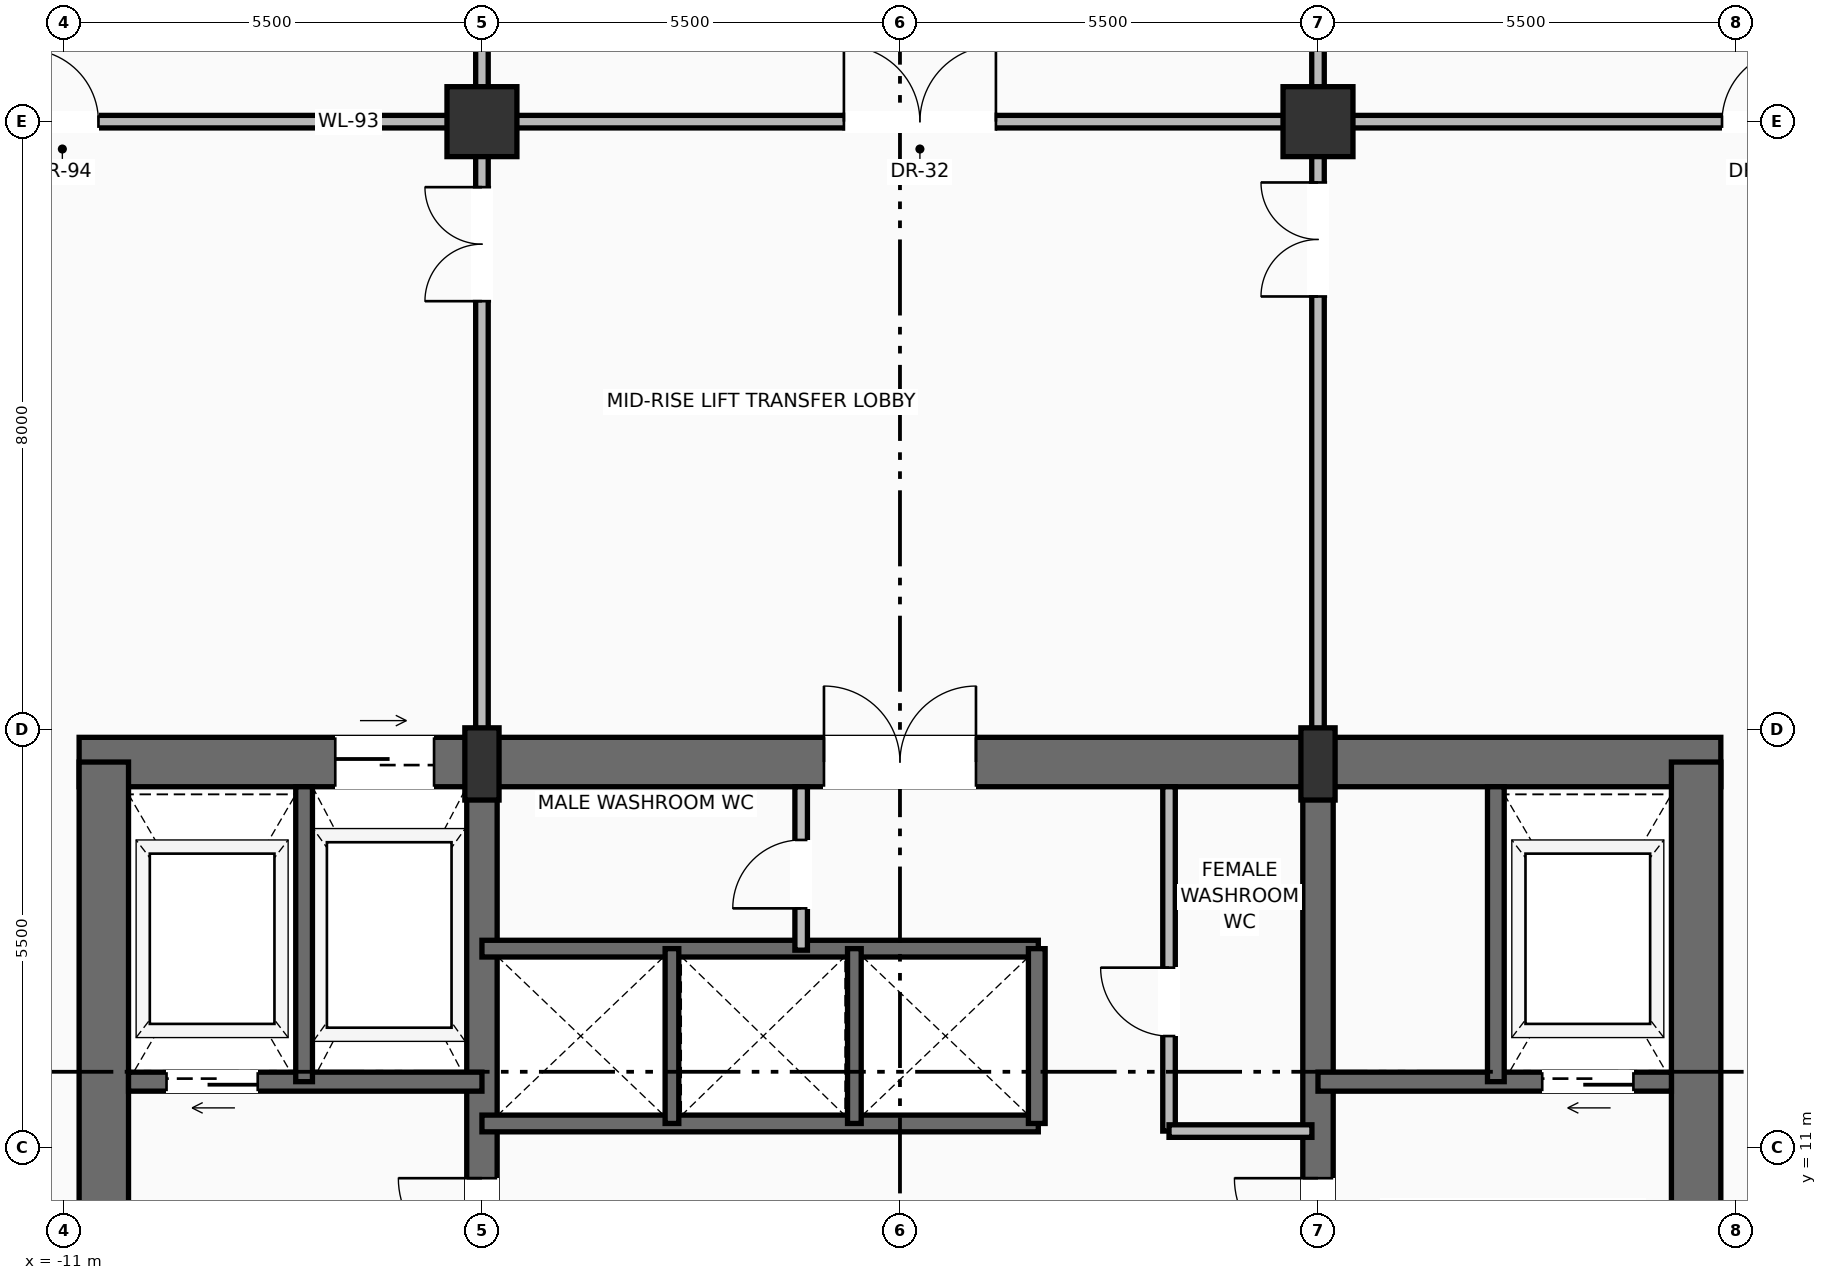
"""IFC4 building model, lengths in metres.
Left out: names, types, materials, properties, quantities, classifications, styles, units other than length and angle.
Written with IfcOpenShell. Run it as: python <this file> out.ifc"""

import sys

from ifc_helpers import new_model, si_unit, direction, frame, frame_2d, origin, origin_2d, place, context, subcontext, project, spatial, rectangle, extrude, source, transform, mapped, element, fill, save


model = new_model("IFC4")
c1 = context("Model", 3, precision=1e-05, world=origin(), true_north=direction((0.0, 1.0)))
c2 = subcontext(c1, "Body", "Model", "MODEL_VIEW")
j1 = project(units=[si_unit("LENGTHUNIT", "METRE"), si_unit("PLANEANGLEUNIT", "RADIAN")], contexts=[c1])
p1 = place(None, origin())
s1 = spatial("IfcSite", under=j1, at=p1, CompositionType="ELEMENT")
p2 = place(p1, origin())
s2 = spatial("IfcBuilding", under=s1, at=p2, CompositionType="ELEMENT")
p3 = place(p2, frame((0.0, 0.0, 121.0)))
s3 = spatial("IfcBuildingStorey", under=s2, at=p3, CompositionType="ELEMENT", Elevation=121.0)
p4 = place(p3, frame((-10.8, 16.075, 0.0), z_axis=(0.0, 0.0, 1.0), x_axis=(1.0, 0.0, 0.0)))
e1 = element("IfcWall", 1, at=p4, inside=s3, PredefinedType="SHEAR", context=c2, shape_type="SweptSolid", body=[
    extrude(rectangle(XDim=21.6, YDim=0.65, at=frame_2d((10.8, 0.0))), origin(), (0.0, 0.0, 1.0), 4.37),
])
p5 = place(p4, frame((3.37, 0.0, 0.0)))
e2 = element("IfcOpeningElement", 2, at=p5, cuts=e1, PredefinedType="OPENING", context=c2, shape_type="SweptSolid", body=[
    extrude(rectangle(XDim=1.3, YDim=2.3, at=frame_2d((0.65, 1.15))), frame((0.0, 0.335, 0.0), z_axis=(0.0, -1.0, 0.0), x_axis=(1.0, 0.0, 0.0)), (0.0, 0.0, 1.0), 0.67),
])
p6 = place(p4, frame((9.8, 0.0, 0.0)))
e3 = element("IfcOpeningElement", 3, at=p6, cuts=e1, PredefinedType="OPENING", context=c2, shape_type="SweptSolid", body=[
    extrude(rectangle(XDim=2.0, YDim=2.4, at=frame_2d((1.0, 1.2))), frame((0.0, 0.335, 0.0), z_axis=(0.0, -1.0, 0.0), x_axis=(1.0, 0.0, 0.0)), (0.0, 0.0, 1.0), 0.67),
])
for number, where, z_axis, x_axis in (
    (4, (-10.475, 0.525, 0.0), (0.0, 0.0, 1.0), (0.0, 1.0, 0.0)),
    (5, (10.475, 0.525, 0.0), (0.0, 0.0, 1.0), (0.0, 1.0, 0.0)),
):
    element("IfcWall", number, at=place(p3, frame(where, z_axis=z_axis, x_axis=x_axis)), inside=s3, PredefinedType="SHEAR", context=c2, shape_type="SweptSolid", body=[
        extrude(rectangle(XDim=15.55, YDim=0.65, at=frame_2d((7.775, 0.0))), origin(), (0.0, 0.0, 1.0), 4.37),
    ])
p7 = place(p3, frame((-5.5, 0.525, 0.0), z_axis=(0.0, 0.0, 1.0), x_axis=(0.0, 1.0, 0.0)))
e6 = element("IfcWall", 6, at=p7, inside=s3, PredefinedType="SHEAR", context=c2, shape_type="SweptSolid", body=[
    extrude(rectangle(XDim=15.55, YDim=0.4, at=frame_2d((7.775, 0.0))), origin(), (0.0, 0.0, 1.0), 4.37),
])
p8 = place(p7, frame((8.975, 0.0, 0.0)))
e7 = element("IfcOpeningElement", 7, at=p8, cuts=e6, PredefinedType="OPENING", context=c2, shape_type="SweptSolid", body=[
    extrude(rectangle(XDim=1.1, YDim=2.2, at=frame_2d((0.55, 1.1))), frame((0.0, 0.21, 0.0), z_axis=(0.0, -1.0, 0.0), x_axis=(1.0, 0.0, 0.0)), (0.0, 0.0, 1.0), 0.42),
])
p9 = place(p3, frame((5.5, 0.525, 0.0), z_axis=(0.0, 0.0, 1.0), x_axis=(0.0, 1.0, 0.0)))
e8 = element("IfcWall", 8, at=p9, inside=s3, PredefinedType="SHEAR", context=c2, shape_type="SweptSolid", body=[
    extrude(rectangle(XDim=15.55, YDim=0.4, at=frame_2d((7.775, 0.0))), origin(), (0.0, 0.0, 1.0), 4.37),
])
p10 = place(p9, frame((8.975, 0.0, 0.0)))
e9 = element("IfcOpeningElement", 9, at=p10, cuts=e8, PredefinedType="OPENING", context=c2, shape_type="SweptSolid", body=[
    extrude(rectangle(XDim=1.1, YDim=2.2, at=frame_2d((0.55, 1.1))), frame((0.0, 0.21, 0.0), z_axis=(0.0, -1.0, 0.0), x_axis=(1.0, 0.0, 0.0)), (0.0, 0.0, 1.0), 0.42),
])
m1 = source(origin(), c2, "Body", "SweptSolid", [
    extrude(rectangle(XDim=0.45, YDim=0.95, at=origin_2d()), origin(), (0.0, 0.0, 1.0), 4.6),
])
for number, where, z_axis, x_axis in (
    (10, (-5.5, 16.05, 0.0), (0.0, 0.0, 1.0), (1.0, 0.0, 0.0)),
    (11, (5.5, 16.05, 0.0), (0.0, 0.0, 1.0), (1.0, 0.0, 0.0)),
):
    element("IfcColumn", number, at=place(p3, frame(where, z_axis=z_axis, x_axis=x_axis)), inside=s3, PredefinedType="PILASTER", context=c2, shape_type="MappedRepresentation", body=[
        mapped(m1, transform((0.0, 0.0, 0.0), scale=1.0)),
    ])
m2 = source(origin(), c2, "Body", "SweptSolid", [
    extrude(rectangle(XDim=0.92, YDim=0.92, at=origin_2d()), origin(), (0.0, 0.0, 1.0), 4.6),
])
for number, where, z_axis, x_axis in (
    (12, (-5.5, 24.5, 0.0), (0.0, 0.0, 1.0), (1.0, 0.0, 0.0)),
    (13, (5.5, 24.5, 0.0), (0.0, 0.0, 1.0), (1.0, 0.0, 0.0)),
):
    element("IfcColumn", number, at=place(p3, frame(where, z_axis=z_axis, x_axis=x_axis)), inside=s3, PredefinedType="COLUMN", context=c2, shape_type="MappedRepresentation", body=[
        mapped(m2, transform((0.0, 0.0, 0.0), scale=1.0)),
    ])
p11 = place(p3, frame((-21.204, 17.641, 0.0), z_axis=(0.0, 0.0, 1.0), x_axis=(0.551762134215, 0.834001527125, 0.0)))
e14 = element("IfcWall", 14, at=p11, inside=s3, PredefinedType="SOLIDWALL", context=c2, shape_type="SweptSolid", body=[
    extrude(rectangle(XDim=18.066, YDim=0.28, at=frame_2d((9.033, 0.0))), origin(), (0.0, 0.0, 1.0), 3.95),
])
p12 = place(p11, frame((4.336, 0.0, 0.0)))
e15 = element("IfcOpeningElement", 15, at=p12, cuts=e14, PredefinedType="OPENING", context=c2, shape_type="SweptSolid", body=[
    extrude(rectangle(XDim=1.6, YDim=2.35, at=frame_2d((0.8, 1.175))), frame((0.0, 0.15, 0.0), z_axis=(0.0, -1.0, 0.0), x_axis=(1.0, 0.0, 0.0)), (0.0, 0.0, 1.0), 0.3),
])
p13 = place(p11, frame((12.285, 0.0, 0.9)))
e16 = element("IfcOpeningElement", 16, at=p13, cuts=e14, PredefinedType="OPENING", context=c2, shape_type="SweptSolid", body=[
    extrude(rectangle(XDim=2.0, YDim=1.55, at=frame_2d((1.0, 0.775))), frame((0.0, 0.15, 0.0), z_axis=(0.0, -1.0, 0.0), x_axis=(1.0, 0.0, 0.0)), (0.0, 0.0, 1.0), 0.3),
])
p14 = place(p3, frame((-5.5, 11.87, 0.0), z_axis=(0.0, 0.0, 1.0), x_axis=(-1.0, 0.0, 0.0)))
e17 = element("IfcWall", 17, at=p14, inside=s3, PredefinedType="SOLIDWALL", context=c2, shape_type="SweptSolid", body=[
    extrude(rectangle(XDim=4.65, YDim=0.25, at=frame_2d((2.325, 0.0))), origin(), (0.0, 0.0, 1.0), 4.37),
])
p15 = place(p14, frame((2.95, 0.0, 0.0)))
e18 = element("IfcOpeningElement", 18, at=p15, cuts=e17, PredefinedType="OPENING", context=c2, shape_type="SweptSolid", body=[
    extrude(rectangle(XDim=1.2, YDim=2.25, at=frame_2d((0.6, 1.125))), frame((0.0, 0.135, 0.0), z_axis=(0.0, -1.0, 0.0), x_axis=(1.0, 0.0, 0.0)), (0.0, 0.0, 1.0), 0.27),
])
p16 = place(p3, frame((-7.84, 11.87, 0.0), z_axis=(0.0, 0.0, 1.0), x_axis=(0.0, 1.0, 0.0)))
e19 = element("IfcWall", 19, at=p16, inside=s3, PredefinedType="SOLIDWALL", context=c2, shape_type="SweptSolid", body=[
    extrude(rectangle(XDim=3.88, YDim=0.22, at=frame_2d((1.94, 0.0))), origin(), (0.0, 0.0, 1.0), 4.37),
])
p17 = place(p3, frame((10.15, 11.87, 0.0), z_axis=(0.0, 0.0, 1.0), x_axis=(-1.0, 0.0, 0.0)))
e20 = element("IfcWall", 20, at=p17, inside=s3, PredefinedType="SOLIDWALL", context=c2, shape_type="SweptSolid", body=[
    extrude(rectangle(XDim=4.65, YDim=0.25, at=frame_2d((2.325, 0.0))), origin(), (0.0, 0.0, 1.0), 4.37),
])
p18 = place(p17, frame((0.5, 0.0, 0.0)))
e21 = element("IfcOpeningElement", 21, at=p18, cuts=e20, PredefinedType="OPENING", context=c2, shape_type="SweptSolid", body=[
    extrude(rectangle(XDim=1.2, YDim=2.25, at=frame_2d((0.6, 1.125))), frame((0.0, 0.135, 0.0), z_axis=(0.0, -1.0, 0.0), x_axis=(1.0, 0.0, 0.0)), (0.0, 0.0, 1.0), 0.27),
])
p19 = place(p3, frame((7.84, 11.87, 0.0), z_axis=(0.0, 0.0, 1.0), x_axis=(0.0, 1.0, 0.0)))
e22 = element("IfcWall", 22, at=p19, inside=s3, PredefinedType="SOLIDWALL", context=c2, shape_type="SweptSolid", body=[
    extrude(rectangle(XDim=3.88, YDim=0.22, at=frame_2d((1.94, 0.0))), origin(), (0.0, 0.0, 1.0), 4.37),
])
for number, where, z_axis, x_axis in (
    (23, (-5.5, 11.32, 0.0), (0.0, 0.0, 1.0), (1.0, 0.0, 0.0)),
    (24, (-5.5, 13.62, 0.0), (0.0, 0.0, 1.0), (1.0, 0.0, 0.0)),
):
    element("IfcWall", number, at=place(p3, frame(where, z_axis=z_axis, x_axis=x_axis)), inside=s3, PredefinedType="SOLIDWALL", context=c2, shape_type="SweptSolid", body=[
        extrude(rectangle(XDim=7.32, YDim=0.22, at=frame_2d((3.66, 0.0))), origin(), (0.0, 0.0, 1.0), 4.37),
    ])
p20 = place(p3, frame((1.8, 11.32, 0.0), z_axis=(0.0, 0.0, 1.0), x_axis=(0.0, 1.0, 0.0)))
e25 = element("IfcWall", 25, at=p20, inside=s3, PredefinedType="SOLIDWALL", context=c2, shape_type="SweptSolid", body=[
    extrude(rectangle(XDim=2.3, YDim=0.22, at=frame_2d((1.15, 0.0))), origin(), (0.0, 0.0, 1.0), 4.37),
])
for number, where, z_axis, x_axis in (
    (26, (-3.0, 11.32, 0.0), (0.0, 0.0, 1.0), (0.0, 1.0, 0.0)),
    (27, (-0.6, 11.32, 0.0), (0.0, 0.0, 1.0), (0.0, 1.0, 0.0)),
):
    element("IfcWall", number, at=place(p3, frame(where, z_axis=z_axis, x_axis=x_axis)), inside=s3, PredefinedType="SOLIDWALL", context=c2, shape_type="SweptSolid", body=[
        extrude(rectangle(XDim=2.3, YDim=0.18, at=frame_2d((1.15, 0.0))), origin(), (0.0, 0.0, 1.0), 4.37),
    ])
p21 = place(p3, frame((-1.3, 13.6, 0.0), z_axis=(0.0, 0.0, 1.0), x_axis=(0.0, 1.0, 0.0)))
e28 = element("IfcWall", 28, at=p21, inside=s3, PredefinedType="PARTITIONING", context=c2, shape_type="SweptSolid", body=[
    extrude(rectangle(XDim=2.15, YDim=0.165, at=frame_2d((1.075, 0.0))), origin(), (0.0, 0.0, 1.0), 4.362),
])
p22 = place(p21, frame((0.55, 0.0, 0.0)))
e29 = element("IfcOpeningElement", 29, at=p22, cuts=e28, PredefinedType="OPENING", context=c2, shape_type="SweptSolid", body=[
    extrude(rectangle(XDim=0.9, YDim=2.1, at=frame_2d((0.45, 1.05))), frame((0.0, 0.093, 0.0), z_axis=(0.0, -1.0, 0.0), x_axis=(1.0, 0.0, 0.0)), (0.0, 0.0, 1.0), 0.185),
])
p23 = place(p3, frame((3.54, 11.22, 0.0), z_axis=(0.0, 0.0, 1.0), x_axis=(0.0, 1.0, 0.0)))
e30 = element("IfcWall", 30, at=p23, inside=s3, PredefinedType="PARTITIONING", context=c2, shape_type="SweptSolid", body=[
    extrude(rectangle(XDim=4.53, YDim=0.165, at=frame_2d((2.265, 0.0))), origin(), (0.0, 0.0, 1.0), 4.362),
])
p24 = place(p23, frame((1.25, 0.0, 0.0)))
e31 = element("IfcOpeningElement", 31, at=p24, cuts=e30, PredefinedType="OPENING", context=c2, shape_type="SweptSolid", body=[
    extrude(rectangle(XDim=0.9, YDim=2.1, at=frame_2d((0.45, 1.05))), frame((0.0, 0.093, 0.0), z_axis=(0.0, -1.0, 0.0), x_axis=(1.0, 0.0, 0.0)), (0.0, 0.0, 1.0), 0.185),
])
p25 = place(p3, frame((3.54, 11.22, 0.0), z_axis=(0.0, 0.0, 1.0), x_axis=(1.0, 0.0, 0.0)))
e32 = element("IfcWall", 32, at=p25, inside=s3, PredefinedType="PARTITIONING", context=c2, shape_type="SweptSolid", body=[
    extrude(rectangle(XDim=1.88, YDim=0.165, at=frame_2d((0.94, 0.0))), origin(), (0.0, 0.0, 1.0), 4.362),
])
p26 = place(p3, frame((-16.822, 24.5, 0.0), z_axis=(0.0, 0.0, 1.0), x_axis=(1.0, 0.0, 0.0)))
e33 = element("IfcWall", 33, at=p26, inside=s3, PredefinedType="PARTITIONING", context=c2, shape_type="SweptSolid", body=[
    extrude(rectangle(XDim=34.168, YDim=0.165, at=frame_2d((17.084, 0.0))), origin(), (0.0, 0.0, 1.0), 3.746),
])
p27 = place(p26, frame((16.084, 0.0, 0.0)))
e34 = element("IfcOpeningElement", 34, at=p27, cuts=e33, PredefinedType="OPENING", context=c2, shape_type="SweptSolid", body=[
    extrude(rectangle(XDim=2.0, YDim=2.4, at=frame_2d((1.0, 1.2))), frame((0.0, 0.093, 0.0), z_axis=(0.0, -1.0, 0.0), x_axis=(1.0, 0.0, 0.0)), (0.0, 0.0, 1.0), 0.185),
])
p28 = place(p26, frame((5.326, 0.0, 0.0)))
e35 = element("IfcOpeningElement", 35, at=p28, cuts=e33, PredefinedType="OPENING", context=c2, shape_type="SweptSolid", body=[
    extrude(rectangle(XDim=0.95, YDim=2.2, at=frame_2d((0.475, 1.1))), frame((0.0, 0.093, 0.0), z_axis=(0.0, -1.0, 0.0), x_axis=(1.0, 0.0, 0.0)), (0.0, 0.0, 1.0), 0.185),
])
p29 = place(p26, frame((27.637, 0.0, 0.0)))
e36 = element("IfcOpeningElement", 36, at=p29, cuts=e33, PredefinedType="OPENING", context=c2, shape_type="SweptSolid", body=[
    extrude(rectangle(XDim=0.95, YDim=2.2, at=frame_2d((0.475, 1.1))), frame((0.0, 0.093, 0.0), z_axis=(0.0, -1.0, 0.0), x_axis=(1.0, 0.0, 0.0)), (0.0, 0.0, 1.0), 0.185),
])
p30 = place(p3, frame((-5.5, 16.42, 0.0), z_axis=(0.0, 0.0, 1.0), x_axis=(0.0, 1.0, 0.0)))
e37 = element("IfcWall", 37, at=p30, inside=s3, PredefinedType="PARTITIONING", context=c2, shape_type="SweptSolid", body=[
    extrude(rectangle(XDim=25.193, YDim=0.165, at=frame_2d((12.597, 0.0))), origin(), (0.0, 0.0, 1.0), 3.746),
])
p31 = place(p30, frame((5.718, 0.0, 0.0)))
e38 = element("IfcOpeningElement", 38, at=p31, cuts=e37, PredefinedType="OPENING", context=c2, shape_type="SweptSolid", body=[
    extrude(rectangle(XDim=1.5, YDim=2.25, at=frame_2d((0.75, 1.125))), frame((0.0, 0.093, 0.0), z_axis=(0.0, -1.0, 0.0), x_axis=(1.0, 0.0, 0.0)), (0.0, 0.0, 1.0), 0.185),
])
p32 = place(p30, frame((19.427, 0.0, 0.0)))
e39 = element("IfcOpeningElement", 39, at=p32, cuts=e37, PredefinedType="OPENING", context=c2, shape_type="SweptSolid", body=[
    extrude(rectangle(XDim=0.95, YDim=2.2, at=frame_2d((0.475, 1.1))), frame((0.0, 0.093, 0.0), z_axis=(0.0, -1.0, 0.0), x_axis=(1.0, 0.0, 0.0)), (0.0, 0.0, 1.0), 0.185),
])
p33 = place(p3, frame((5.5, 16.42, 0.0), z_axis=(0.0, 0.0, 1.0), x_axis=(0.0, 1.0, 0.0)))
e40 = element("IfcWall", 40, at=p33, inside=s3, PredefinedType="PARTITIONING", context=c2, shape_type="SweptSolid", body=[
    extrude(rectangle(XDim=25.943, YDim=0.165, at=frame_2d((12.972, 0.0))), origin(), (0.0, 0.0, 1.0), 3.746),
])
p34 = place(p33, frame((5.78, 0.0, 0.0)))
e41 = element("IfcOpeningElement", 41, at=p34, cuts=e40, PredefinedType="OPENING", context=c2, shape_type="SweptSolid", body=[
    extrude(rectangle(XDim=1.5, YDim=2.25, at=frame_2d((0.75, 1.125))), frame((0.0, 0.093, 0.0), z_axis=(0.0, -1.0, 0.0), x_axis=(1.0, 0.0, 0.0)), (0.0, 0.0, 1.0), 0.185),
])
p35 = place(p33, frame((19.929, 0.0, 0.0)))
e42 = element("IfcOpeningElement", 42, at=p35, cuts=e40, PredefinedType="OPENING", context=c2, shape_type="SweptSolid", body=[
    extrude(rectangle(XDim=0.95, YDim=2.2, at=frame_2d((0.475, 1.1))), frame((0.0, 0.093, 0.0), z_axis=(0.0, -1.0, 0.0), x_axis=(1.0, 0.0, 0.0)), (0.0, 0.0, 1.0), 0.185),
])
m3 = source(origin(), c2, "Body", "SweptSolid", [
    extrude(rectangle(XDim=1.1, YDim=2.2, at=frame_2d((0.55, 1.1))), frame((0.0, 0.025, 0.0), z_axis=(0.0, -1.0, 0.0), x_axis=(1.0, 0.0, 0.0)), (0.0, 0.0, 1.0), 0.05),
])
p36 = place(p8, origin())
e43 = element("IfcDoor", 43, at=p36, inside=s3, OperationType="SINGLE_SWING_RIGHT", PredefinedType="DOOR", context=c2, shape_type="MappedRepresentation", body=[
    mapped(m3, transform((0.0, 0.0, 0.0), scale=1.0)),
])
fill(e7, e43)
m4 = source(origin(), c2, "Body", "SweptSolid", [
    extrude(rectangle(XDim=1.2, YDim=2.25, at=frame_2d((0.6, 1.125))), frame((0.0, 0.025, 0.0), z_axis=(0.0, -1.0, 0.0), x_axis=(1.0, 0.0, 0.0)), (0.0, 0.0, 1.0), 0.05),
])
p37 = place(p15, origin())
e44 = element("IfcDoor", 44, at=p37, inside=s3, OperationType="SLIDING_TO_LEFT", PredefinedType="DOOR", context=c2, shape_type="MappedRepresentation", body=[
    mapped(m4, transform((0.0, 0.0, 0.0), scale=1.0)),
])
fill(e18, e44)
m5 = source(origin(), c2, "Body", "SweptSolid", [
    extrude(rectangle(XDim=1.3, YDim=2.3, at=frame_2d((0.65, 1.15))), frame((0.0, 0.025, 0.0), z_axis=(0.0, -1.0, 0.0), x_axis=(1.0, 0.0, 0.0)), (0.0, 0.0, 1.0), 0.05),
])
p38 = place(p5, origin())
e45 = element("IfcDoor", 45, at=p38, inside=s3, OperationType="SLIDING_TO_RIGHT", PredefinedType="DOOR", context=c2, shape_type="MappedRepresentation", body=[
    mapped(m5, transform((0.0, 0.0, 0.0), scale=1.0)),
])
fill(e2, e45)
p39 = place(p10, origin())
e46 = element("IfcDoor", 46, at=p39, inside=s3, OperationType="SINGLE_SWING_RIGHT", PredefinedType="DOOR", context=c2, shape_type="MappedRepresentation", body=[
    mapped(m3, transform((0.0, 0.0, 0.0), scale=1.0)),
])
fill(e9, e46)
p40 = place(p18, origin())
e47 = element("IfcDoor", 47, at=p40, inside=s3, OperationType="SLIDING_TO_RIGHT", PredefinedType="DOOR", context=c2, shape_type="MappedRepresentation", body=[
    mapped(m4, transform((0.0, 0.0, 0.0), scale=1.0)),
])
fill(e21, e47)
m6 = source(origin(), c2, "Body", "SweptSolid", [
    extrude(rectangle(XDim=2.0, YDim=2.4, at=frame_2d((1.0, 1.2))), frame((0.0, 0.025, 0.0), z_axis=(0.0, -1.0, 0.0), x_axis=(1.0, 0.0, 0.0)), (0.0, 0.0, 1.0), 0.05),
])
p41 = place(p6, origin())
e48 = element("IfcDoor", 48, at=p41, inside=s3, OperationType="DOUBLE_DOOR_SINGLE_SWING", PredefinedType="DOOR", context=c2, shape_type="MappedRepresentation", body=[
    mapped(m6, transform((0.0, 0.0, 0.0), scale=1.0)),
])
fill(e3, e48)
m7 = source(origin(), c2, "Body", "SweptSolid", [
    extrude(rectangle(XDim=0.9, YDim=2.1, at=frame_2d((0.45, 1.05))), frame((0.0, 0.025, 0.0), z_axis=(0.0, -1.0, 0.0), x_axis=(1.0, 0.0, 0.0)), (0.0, 0.0, 1.0), 0.05),
])
p42 = place(p22, origin())
e49 = element("IfcDoor", 49, at=p42, inside=s3, OperationType="SINGLE_SWING_LEFT", PredefinedType="DOOR", context=c2, shape_type="MappedRepresentation", body=[
    mapped(m7, transform((0.0, 0.0, 0.0), scale=1.0)),
])
fill(e29, e49)
p43 = place(p24, origin())
e50 = element("IfcDoor", 50, at=p43, inside=s3, OperationType="SINGLE_SWING_RIGHT", PredefinedType="DOOR", context=c2, shape_type="MappedRepresentation", body=[
    mapped(m7, transform((0.0, 0.0, 0.0), scale=1.0)),
])
fill(e31, e50)
p44 = place(p27, origin())
e51 = element("IfcDoor", 51, at=p44, inside=s3, OperationType="DOUBLE_DOOR_SINGLE_SWING", PredefinedType="DOOR", context=c2, shape_type="MappedRepresentation", body=[
    mapped(m6, transform((0.0, 0.0, 0.0), scale=1.0)),
])
fill(e34, e51)
m8 = source(origin(), c2, "Body", "SweptSolid", [
    extrude(rectangle(XDim=1.5, YDim=2.25, at=frame_2d((0.75, 1.125))), frame((0.0, 0.025, 0.0), z_axis=(0.0, -1.0, 0.0), x_axis=(1.0, 0.0, 0.0)), (0.0, 0.0, 1.0), 0.05),
])
p45 = place(p31, origin())
e52 = element("IfcDoor", 52, at=p45, inside=s3, OperationType="DOUBLE_DOOR_SINGLE_SWING", PredefinedType="DOOR", context=c2, shape_type="MappedRepresentation", body=[
    mapped(m8, transform((0.0, 0.0, 0.0), scale=1.0)),
])
fill(e38, e52)
p46 = place(p34, origin())
e53 = element("IfcDoor", 53, at=p46, inside=s3, OperationType="DOUBLE_DOOR_SINGLE_SWING", PredefinedType="DOOR", context=c2, shape_type="MappedRepresentation", body=[
    mapped(m8, transform((0.0, 0.0, 0.0), scale=1.0)),
])
fill(e41, e53)
m9 = source(origin(), c2, "Body", "SweptSolid", [
    extrude(rectangle(XDim=0.95, YDim=2.2, at=frame_2d((0.475, 1.1))), frame((0.0, 0.025, 0.0), z_axis=(0.0, -1.0, 0.0), x_axis=(1.0, 0.0, 0.0)), (0.0, 0.0, 1.0), 0.05),
])
p47 = place(p28, origin())
e54 = element("IfcDoor", 54, at=p47, inside=s3, OperationType="SINGLE_SWING_LEFT", PredefinedType="DOOR", context=c2, shape_type="MappedRepresentation", body=[
    mapped(m9, transform((0.0, 0.0, 0.0), scale=1.0)),
])
fill(e35, e54)
p48 = place(p29, origin())
e55 = element("IfcDoor", 55, at=p48, inside=s3, OperationType="SINGLE_SWING_RIGHT", PredefinedType="DOOR", context=c2, shape_type="MappedRepresentation", body=[
    mapped(m9, transform((0.0, 0.0, 0.0), scale=1.0)),
])
fill(e36, e55)
save(model, sys.argv[1])
